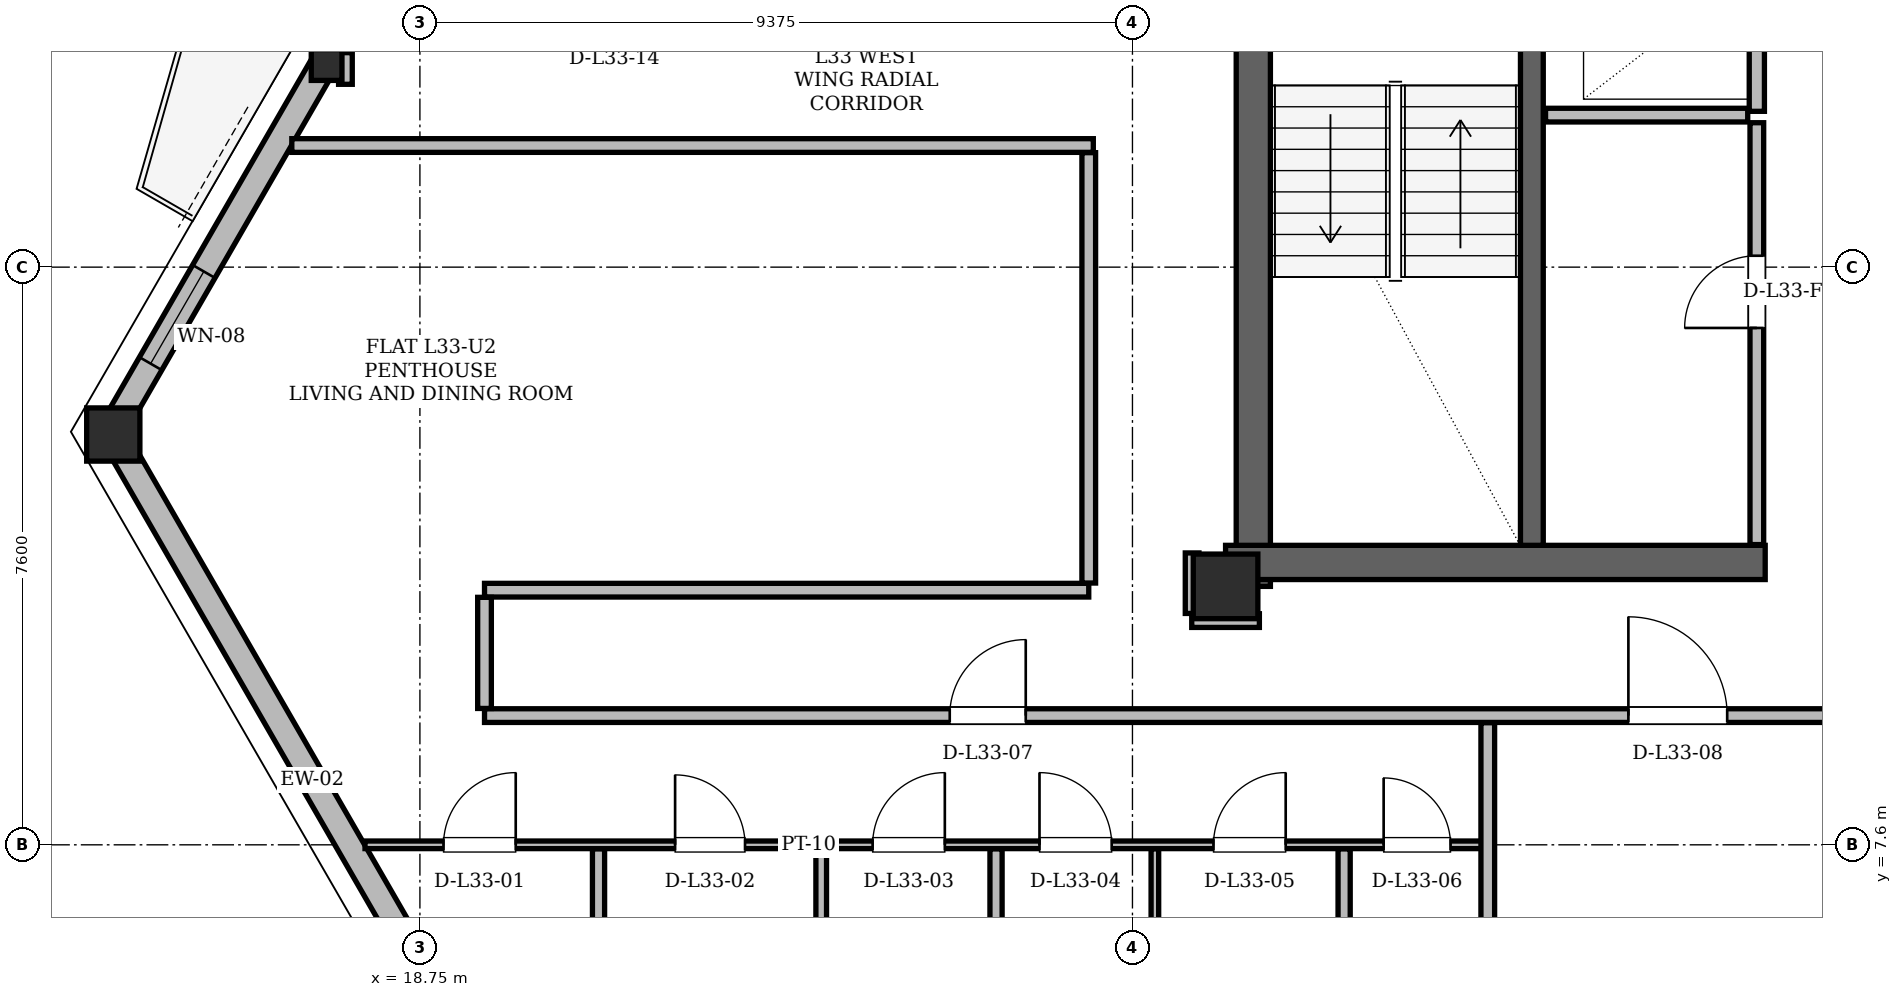
"""IFC4 building model, lengths in metres.
Left out: names, types, materials, properties, quantities, classifications, styles, units other than length and angle.
Written with IfcOpenShell. Run it as: python <this file> out.ifc"""

import sys

from ifc_helpers import new_model, si_unit, direction, frame, frame_2d, origin, origin_2d, place, context, subcontext, project, spatial, rectangle, hollow_rectangle, i_section, extrude, element, fill, save


model = new_model("IFC4")
c1 = context("Model", 3, precision=1e-05, world=origin(), true_north=direction((0.0, 1.0)))
c2 = subcontext(c1, "Body", "Model", "MODEL_VIEW")
j1 = project(units=[si_unit("LENGTHUNIT", "METRE"), si_unit("PLANEANGLEUNIT", "RADIAN")], contexts=[c1])
p1 = place(None, origin())
s1 = spatial("IfcSite", under=j1, at=p1, CompositionType="ELEMENT")
p2 = place(p1, origin())
s2 = spatial("IfcBuilding", under=s1, at=p2, CompositionType="ELEMENT")
p3 = place(p2, frame((0.0, 0.0, 126.6)))
s3 = spatial("IfcBuildingStorey", under=s2, at=p3, CompositionType="ELEMENT", Elevation=126.6)
p4 = place(p3, frame((29.35, 11.0, 0.0), z_axis=(0.0, 0.0, 1.0), x_axis=(1.0, 0.0, 0.0)))
e1 = element("IfcColumn", 1, at=p4, inside=s3, PredefinedType="COLUMN", context=c2, shape_type="SweptSolid", body=[
    extrude(hollow_rectangle(XDim=0.85, YDim=0.85, WallThickness=0.07, at=origin_2d()), origin(), (0.0, 0.0, 1.0), 3.6),
])
p5 = place(p3, frame((14.689, 13.034, 0.004), z_axis=(0.014612382171, -0.020117512198, 0.999690834203), x_axis=(0.809090542382, 0.587684008825, 0.0)))
e2 = element("IfcColumn", 2, at=p5, inside=s3, PredefinedType="COLUMN", context=c2, shape_type="SweptSolid", body=[
    extrude(hollow_rectangle(XDim=0.7, YDim=0.7, WallThickness=0.055, at=origin_2d()), origin(), (0.0, 0.0, 1.0), 3.592),
])
p6 = place(p3, frame((17.493, 17.891, 0.004), z_axis=(0.01617604101, -0.017263505952, 0.999720114362), x_axis=(0.729716361997, 0.68374997699, 0.0)))
e3 = element("IfcColumn", 3, at=p6, inside=s3, PredefinedType="COLUMN", context=c2, shape_type="SweptSolid", body=[
    extrude(i_section(OverallWidth=0.404, OverallDepth=0.406, WebThickness=0.027, FlangeThickness=0.044, at=origin_2d()), origin(), (0.0, 0.0, 1.0), 3.592),
])
p7 = place(p3, frame((29.715, 11.0, 0.0), z_axis=(0.0, 0.0, 1.0), x_axis=(0.0, 1.0, 0.0)))
e4 = element("IfcWall", 4, at=p7, inside=s3, PredefinedType="SHEAR", context=c2, shape_type="SweptSolid", body=[
    extrude(rectangle(XDim=13.3, YDim=0.45, at=frame_2d((6.65, 0.0))), origin(), (0.0, 0.0, 1.0), 3.36),
])
p8 = place(p3, frame((29.35, 11.315, 0.0), z_axis=(0.0, 0.0, 1.0), x_axis=(1.0, 0.0, 0.0)))
e5 = element("IfcWall", 5, at=p8, inside=s3, PredefinedType="SHEAR", context=c2, shape_type="SweptSolid", body=[
    extrude(rectangle(XDim=7.1, YDim=0.45, at=frame_2d((3.55, 0.0))), origin(), (0.0, 0.0, 1.0), 3.36),
])
p9 = place(p3, frame((33.38, 11.54, 0.0), z_axis=(0.0, 0.0, 1.0), x_axis=(0.0, 1.0, 0.0)))
e6 = element("IfcWall", 6, at=p9, inside=s3, PredefinedType="SHEAR", context=c2, shape_type="SweptSolid", body=[
    extrude(rectangle(XDim=7.62, YDim=0.3, at=frame_2d((3.81, 0.0))), origin(), (0.0, 0.0, 1.0), 3.36),
])
p10 = place(p3, frame((14.689, 13.034, 0.0), z_axis=(0.0, 0.0, 1.0), x_axis=(0.500003640647, -0.866023301845, 0.0)))
e7 = element("IfcWall", 7, at=p10, inside=s3, PredefinedType="SOLIDWALL", context=c2, shape_type="SweptSolid", body=[
    extrude(rectangle(XDim=10.572, YDim=0.34, at=frame_2d((5.286, 0.0))), origin(), (0.0, 0.0, 1.0), 2.578),
])
p11 = place(p3, frame((32.214, 43.387, 0.0), z_axis=(0.0, 0.0, 1.0), x_axis=(-0.499998814518, -0.866026088222, 0.0)))
e8 = element("IfcWall", 8, at=p11, inside=s3, PredefinedType="SOLIDWALL", context=c2, shape_type="SweptSolid", body=[
    extrude(rectangle(XDim=35.049, YDim=0.34, at=frame_2d((17.524, 0.0))), origin(), (0.0, 0.0, 1.0), 2.578),
])
p12 = place(p11, frame((8.034, 0.0, 0.0)))
e9 = element("IfcOpeningElement", 9, at=p12, cuts=e8, PredefinedType="OPENING", context=c2, shape_type="SweptSolid", body=[
    extrude(rectangle(XDim=1.5, YDim=2.2, at=frame_2d((0.75, 1.1))), frame((0.0, 0.17, 0.0), z_axis=(0.0, -1.0, 0.0), x_axis=(1.0, 0.0, 0.0)), (0.0, 0.0, 1.0), 0.34),
])
p13 = place(p11, frame((26.97, 0.0, 0.0)))
e10 = element("IfcOpeningElement", 10, at=p13, cuts=e8, PredefinedType="OPENING", context=c2, shape_type="SweptSolid", body=[
    extrude(rectangle(XDim=1.5, YDim=2.2, at=frame_2d((0.75, 1.1))), frame((0.0, 0.17, 0.0), z_axis=(0.0, -1.0, 0.0), x_axis=(1.0, 0.0, 0.0)), (0.0, 0.0, 1.0), 0.34),
])
p14 = place(p11, frame((32.614, 0.0, 0.85)))
e11 = element("IfcOpeningElement", 11, at=p14, cuts=e8, PredefinedType="OPENING", context=c2, shape_type="SweptSolid", body=[
    extrude(rectangle(XDim=1.4, YDim=1.6, at=frame_2d((0.7, 0.8))), frame((0.0, 0.17, 0.0), z_axis=(0.0, -1.0, 0.0), x_axis=(1.0, 0.0, 0.0)), (0.0, 0.0, 1.0), 0.34),
])
p15 = place(p11, frame((22.603, 0.0, 0.85)))
e12 = element("IfcOpeningElement", 12, at=p15, cuts=e8, PredefinedType="OPENING", context=c2, shape_type="SweptSolid", body=[
    extrude(rectangle(XDim=1.2, YDim=1.48, at=frame_2d((0.6, 0.74))), frame((0.0, 0.17, 0.0), z_axis=(0.0, -1.0, 0.0), x_axis=(1.0, 0.0, 0.0)), (0.0, 0.0, 1.0), 0.34),
])
p16 = place(p11, frame((2.414, 0.0, 0.85)))
e13 = element("IfcOpeningElement", 13, at=p16, cuts=e8, PredefinedType="OPENING", context=c2, shape_type="SweptSolid", body=[
    extrude(rectangle(XDim=1.4, YDim=1.6, at=frame_2d((0.7, 0.8))), frame((0.0, 0.17, 0.0), z_axis=(0.0, -1.0, 0.0), x_axis=(1.0, 0.0, 0.0)), (0.0, 0.0, 1.0), 0.34),
])
p17 = place(p11, frame((13.484, 0.0, 0.85)))
e14 = element("IfcOpeningElement", 14, at=p17, cuts=e8, PredefinedType="OPENING", context=c2, shape_type="SweptSolid", body=[
    extrude(rectangle(XDim=2.5, YDim=1.618, at=frame_2d((1.25, 0.809))), frame((0.0, 0.17, 0.0), z_axis=(0.0, -1.0, 0.0), x_axis=(1.0, 0.0, 0.0)), (0.0, 0.0, 1.0), 0.34),
])
p18 = place(p11, frame((18.27, 0.0, 0.85)))
e15 = element("IfcOpeningElement", 15, at=p18, cuts=e8, PredefinedType="OPENING", context=c2, shape_type="SweptSolid", body=[
    extrude(rectangle(XDim=1.2, YDim=1.48, at=frame_2d((0.6, 0.74))), frame((0.0, 0.17, 0.0), z_axis=(0.0, -1.0, 0.0), x_axis=(1.0, 0.0, 0.0)), (0.0, 0.0, 1.0), 0.34),
])
p19 = place(p11, frame((20.466, 0.0, 0.85)))
e16 = element("IfcOpeningElement", 16, at=p19, cuts=e8, PredefinedType="OPENING", context=c2, shape_type="SweptSolid", body=[
    extrude(rectangle(XDim=1.2, YDim=1.48, at=frame_2d((0.6, 0.74))), frame((0.0, 0.17, 0.0), z_axis=(0.0, -1.0, 0.0), x_axis=(1.0, 0.0, 0.0)), (0.0, 0.0, 1.0), 0.34),
])
p20 = place(p3, frame((36.34, 17.25, 0.0), z_axis=(0.0, 0.0, 1.0), x_axis=(0.0, 1.0, 0.0)))
e17 = element("IfcWall", 17, at=p20, inside=s3, PredefinedType="PARTITIONING", context=c2, shape_type="SweptSolid", body=[
    extrude(rectangle(XDim=2.07, YDim=0.2, at=frame_2d((1.035, 0.0))), origin(), (0.0, 0.0, 1.0), 3.36),
])
p21 = place(p3, frame((33.56, 17.2, 0.0), z_axis=(0.0, 0.0, 1.0), x_axis=(1.0, 0.0, 0.0)))
e18 = element("IfcWall", 18, at=p21, inside=s3, PredefinedType="PARTITIONING", context=c2, shape_type="SweptSolid", body=[
    extrude(rectangle(XDim=2.66, YDim=0.18, at=frame_2d((1.33, 0.0))), origin(), (0.0, 0.0, 1.0), 3.36),
])
p22 = place(p3, frame((36.34, 11.55, 0.0), z_axis=(0.0, 0.0, 1.0), x_axis=(0.0, 1.0, 0.0)))
e19 = element("IfcWall", 19, at=p22, inside=s3, PredefinedType="PARTITIONING", context=c2, shape_type="SweptSolid", body=[
    extrude(rectangle(XDim=5.55, YDim=0.18, at=frame_2d((2.775, 0.0))), origin(), (0.0, 0.0, 1.0), 3.36),
])
p23 = place(p22, frame((2.85, 0.0, 0.0)))
e20 = element("IfcOpeningElement", 20, at=p23, cuts=e19, PredefinedType="OPENING", context=c2, shape_type="SweptSolid", body=[
    extrude(rectangle(XDim=0.95, YDim=2.1, at=frame_2d((0.475, 1.05))), frame((0.0, 0.09, 0.0), z_axis=(0.0, -1.0, 0.0), x_axis=(1.0, 0.0, 0.0)), (0.0, 0.0, 1.0), 0.18),
])
p24 = place(p3, frame((18.028, 7.6, 0.0), z_axis=(0.0, 0.0, 1.0), x_axis=(1.0, 0.0, 0.0)))
e21 = element("IfcWall", 21, at=p24, inside=s3, PredefinedType="PARTITIONING", context=c2, shape_type="SweptSolid", body=[
    extrude(rectangle(XDim=14.823, YDim=0.1, at=frame_2d((7.411, 0.0))), origin(), (0.0, 0.0, 1.0), 2.814),
])
p25 = place(p24, frame((1.033, 0.0, 0.0)))
e22 = element("IfcOpeningElement", 22, at=p25, cuts=e21, PredefinedType="OPENING", context=c2, shape_type="SweptSolid", body=[
    extrude(rectangle(XDim=0.95, YDim=2.1, at=frame_2d((0.475, 1.05))), frame((0.0, 0.05, 0.0), z_axis=(0.0, -1.0, 0.0), x_axis=(1.0, 0.0, 0.0)), (0.0, 0.0, 1.0), 0.1),
])
p26 = place(p24, frame((4.08, 0.0, 0.0)))
e23 = element("IfcOpeningElement", 23, at=p26, cuts=e21, PredefinedType="OPENING", context=c2, shape_type="SweptSolid", body=[
    extrude(rectangle(XDim=0.92, YDim=2.12, at=frame_2d((0.46, 1.06))), frame((0.0, 0.05, 0.0), z_axis=(0.0, -1.0, 0.0), x_axis=(1.0, 0.0, 0.0)), (0.0, 0.0, 1.0), 0.1),
])
p27 = place(p24, frame((6.679, 0.0, 0.0)))
e24 = element("IfcOpeningElement", 24, at=p27, cuts=e21, PredefinedType="OPENING", context=c2, shape_type="SweptSolid", body=[
    extrude(rectangle(XDim=0.95, YDim=2.1, at=frame_2d((0.475, 1.05))), frame((0.0, 0.05, 0.0), z_axis=(0.0, -1.0, 0.0), x_axis=(1.0, 0.0, 0.0)), (0.0, 0.0, 1.0), 0.1),
])
p28 = place(p24, frame((8.874, 0.0, 0.0)))
e25 = element("IfcOpeningElement", 25, at=p28, cuts=e21, PredefinedType="OPENING", context=c2, shape_type="SweptSolid", body=[
    extrude(rectangle(XDim=0.95, YDim=2.1, at=frame_2d((0.475, 1.05))), frame((0.0, 0.05, 0.0), z_axis=(0.0, -1.0, 0.0), x_axis=(1.0, 0.0, 0.0)), (0.0, 0.0, 1.0), 0.1),
])
p29 = place(p24, frame((11.164, 0.0, 0.0)))
e26 = element("IfcOpeningElement", 26, at=p29, cuts=e21, PredefinedType="OPENING", context=c2, shape_type="SweptSolid", body=[
    extrude(rectangle(XDim=0.95, YDim=2.1, at=frame_2d((0.475, 1.05))), frame((0.0, 0.05, 0.0), z_axis=(0.0, -1.0, 0.0), x_axis=(1.0, 0.0, 0.0)), (0.0, 0.0, 1.0), 0.1),
])
p30 = place(p24, frame((13.402, 0.0, 0.0)))
e27 = element("IfcOpeningElement", 27, at=p30, cuts=e21, PredefinedType="OPENING", context=c2, shape_type="SweptSolid", body=[
    extrude(rectangle(XDim=0.88, YDim=2.08, at=frame_2d((0.44, 1.04))), frame((0.0, 0.05, 0.0), z_axis=(0.0, -1.0, 0.0), x_axis=(1.0, 0.0, 0.0)), (0.0, 0.0, 1.0), 0.1),
])
p31 = place(p3, frame((19.6, 9.3, 0.0), z_axis=(0.0, 0.0, 1.0), x_axis=(1.0, 0.0, 0.0)))
e28 = element("IfcWall", 28, at=p31, inside=s3, PredefinedType="PARTITIONING", context=c2, shape_type="SweptSolid", body=[
    extrude(rectangle(XDim=30.4, YDim=0.18, at=frame_2d((15.2, 0.0))), origin(), (0.0, 0.0, 1.0), 2.814),
])
p32 = place(p31, frame((6.121, 0.0, 0.0)))
e29 = element("IfcOpeningElement", 29, at=p32, cuts=e28, PredefinedType="OPENING", context=c2, shape_type="SweptSolid", body=[
    extrude(rectangle(XDim=1.0, YDim=2.18, at=frame_2d((0.5, 1.09))), frame((0.0, 0.09, 0.0), z_axis=(0.0, -1.0, 0.0), x_axis=(1.0, 0.0, 0.0)), (0.0, 0.0, 1.0), 0.18),
])
p33 = place(p31, frame((15.05, 0.0, 0.0)))
e30 = element("IfcOpeningElement", 30, at=p33, cuts=e28, PredefinedType="OPENING", context=c2, shape_type="SweptSolid", body=[
    extrude(rectangle(XDim=1.3, YDim=2.2, at=frame_2d((0.65, 1.1))), frame((0.0, 0.09, 0.0), z_axis=(0.0, -1.0, 0.0), x_axis=(1.0, 0.0, 0.0)), (0.0, 0.0, 1.0), 0.18),
])
p34 = place(p31, frame((24.631, 0.0, 0.0)))
e31 = element("IfcOpeningElement", 31, at=p34, cuts=e28, PredefinedType="OPENING", context=c2, shape_type="SweptSolid", body=[
    extrude(rectangle(XDim=1.0, YDim=2.18, at=frame_2d((0.5, 1.09))), frame((0.0, 0.09, 0.0), z_axis=(0.0, -1.0, 0.0), x_axis=(1.0, 0.0, 0.0)), (0.0, 0.0, 1.0), 0.18),
])
p35 = place(p3, frame((28.905, 10.55, 0.0), z_axis=(0.0, 0.0, 1.0), x_axis=(1.0, 0.0, 0.0)))
e32 = element("IfcWall", 32, at=p35, inside=s3, PredefinedType="PARTITIONING", context=c2, shape_type="SweptSolid", body=[
    extrude(rectangle(XDim=0.89, YDim=0.18, at=frame_2d((0.445, 0.0))), origin(), (0.0, 0.0, 1.0), 3.36),
])
p36 = place(p3, frame((19.6, 10.95, 0.0), z_axis=(0.0, 0.0, 1.0), x_axis=(1.0, 0.0, 0.0)))
e33 = element("IfcWall", 33, at=p36, inside=s3, PredefinedType="PARTITIONING", context=c2, shape_type="SweptSolid", body=[
    extrude(rectangle(XDim=7.95, YDim=0.18, at=frame_2d((3.975, 0.0))), origin(), (0.0, 0.0, 1.0), 3.36),
])
p37 = place(p3, frame((17.065, 16.8, 0.0), z_axis=(0.0, 0.0, 1.0), x_axis=(1.0, 0.0, 0.0)))
e34 = element("IfcWall", 34, at=p37, inside=s3, PredefinedType="PARTITIONING", context=c2, shape_type="SweptSolid", body=[
    extrude(rectangle(XDim=10.545, YDim=0.18, at=frame_2d((5.273, 0.0))), origin(), (0.0, 0.0, 1.0), 3.36),
])
p38 = place(p3, frame((17.77, 17.605, 0.0), z_axis=(0.0, 0.0, 1.0), x_axis=(0.0, 1.0, 0.0)))
e35 = element("IfcWall", 35, at=p38, inside=s3, PredefinedType="PARTITIONING", context=c2, shape_type="SweptSolid", body=[
    extrude(rectangle(XDim=0.417, YDim=0.18, at=frame_2d((0.208, 0.0))), origin(), (0.0, 0.0, 1.0), 2.578),
])
p39 = place(p3, frame((19.6, 9.394, 0.0), z_axis=(0.0, 0.0, 1.0), x_axis=(0.0, 1.0, 0.0)))
e36 = element("IfcWall", 36, at=p39, inside=s3, PredefinedType="PARTITIONING", context=c2, shape_type="SweptSolid", body=[
    extrude(rectangle(XDim=1.462, YDim=0.18, at=frame_2d((0.731, 0.0))), origin(), (0.0, 0.0, 1.0), 3.36),
])
p40 = place(p3, frame((21.1, 4.052, 0.0), z_axis=(0.0, 0.0, 1.0), x_axis=(0.0, 1.0, 0.0)))
e37 = element("IfcWall", 37, at=p40, inside=s3, PredefinedType="PARTITIONING", context=c2, shape_type="SweptSolid", body=[
    extrude(rectangle(XDim=3.494, YDim=0.16, at=frame_2d((1.747, 0.0))), origin(), (0.0, 0.0, 1.0), 2.814),
])
p41 = place(p3, frame((24.03, 4.052, 0.0), z_axis=(0.0, 0.0, 1.0), x_axis=(0.0, 1.0, 0.0)))
e38 = element("IfcWall", 38, at=p41, inside=s3, PredefinedType="PARTITIONING", context=c2, shape_type="SweptSolid", body=[
    extrude(rectangle(XDim=3.494, YDim=0.14, at=frame_2d((1.747, 0.0))), origin(), (0.0, 0.0, 1.0), 2.814),
])
p42 = place(p3, frame((26.33, 4.052, 0.0), z_axis=(0.0, 0.0, 1.0), x_axis=(0.0, 1.0, 0.0)))
e39 = element("IfcWall", 39, at=p42, inside=s3, PredefinedType="PARTITIONING", context=c2, shape_type="SweptSolid", body=[
    extrude(rectangle(XDim=3.494, YDim=0.16, at=frame_2d((1.747, 0.0))), origin(), (0.0, 0.0, 1.0), 2.946),
])
p43 = place(p3, frame((27.55, 11.044, 0.0), z_axis=(0.0, 0.0, 1.0), x_axis=(0.0, 1.0, 0.0)))
e40 = element("IfcWall", 40, at=p43, inside=s3, PredefinedType="PARTITIONING", context=c2, shape_type="SweptSolid", body=[
    extrude(rectangle(XDim=5.662, YDim=0.18, at=frame_2d((2.831, 0.0))), origin(), (0.0, 0.0, 1.0), 2.814),
])
p44 = place(p3, frame((28.42, 4.052, 0.0), z_axis=(0.0, 0.0, 1.0), x_axis=(0.0, 1.0, 0.0)))
e41 = element("IfcWall", 41, at=p44, inside=s3, PredefinedType="PARTITIONING", context=c2, shape_type="SweptSolid", body=[
    extrude(rectangle(XDim=3.494, YDim=0.1, at=frame_2d((1.747, 0.0))), origin(), (0.0, 0.0, 1.0), 3.36),
])
p45 = place(p3, frame((28.91, 10.644, 0.0), z_axis=(0.0, 0.0, 1.0), x_axis=(0.0, 1.0, 0.0)))
e42 = element("IfcWall", 42, at=p45, inside=s3, PredefinedType="PARTITIONING", context=c2, shape_type="SweptSolid", body=[
    extrude(rectangle(XDim=0.796, YDim=0.18, at=frame_2d((0.398, 0.0))), origin(), (0.0, 0.0, 1.0), 2.814),
])
p46 = place(p3, frame((30.91, 4.052, 0.0), z_axis=(0.0, 0.0, 1.0), x_axis=(0.0, 1.0, 0.0)))
e43 = element("IfcWall", 43, at=p46, inside=s3, PredefinedType="PARTITIONING", context=c2, shape_type="SweptSolid", body=[
    extrude(rectangle(XDim=3.494, YDim=0.16, at=frame_2d((1.747, 0.0))), origin(), (0.0, 0.0, 1.0), 2.946),
])
p47 = place(p3, frame((32.8, 5.094, 0.0), z_axis=(0.0, 0.0, 1.0), x_axis=(0.0, 1.0, 0.0)))
e44 = element("IfcWall", 44, at=p47, inside=s3, PredefinedType="PARTITIONING", context=c2, shape_type="SweptSolid", body=[
    extrude(rectangle(XDim=4.112, YDim=0.18, at=frame_2d((2.056, 0.0))), origin(), (0.0, 0.0, 1.0), 2.946),
])
p48 = place(p14, origin())
e45 = element("IfcWindow", 45, at=p48, inside=s3, PartitioningType="SINGLE_PANEL", PredefinedType="WINDOW", context=c2, shape_type="SweptSolid", body=[
    extrude(rectangle(XDim=1.4, YDim=1.6, at=frame_2d((0.7, 0.8))), frame((0.0, 0.03, 0.0), z_axis=(0.0, -1.0, 0.0), x_axis=(1.0, 0.0, 0.0)), (0.0, 0.0, 1.0), 0.06),
])
fill(e11, e45)
p49 = place(p23, origin())
e46 = element("IfcDoor", 46, at=p49, inside=s3, OperationType="SINGLE_SWING_LEFT", PredefinedType="DOOR", context=c2, shape_type="SweptSolid", body=[
    extrude(rectangle(XDim=0.95, YDim=2.1, at=frame_2d((0.475, 1.05))), frame((0.0, 0.025, 0.0), z_axis=(0.0, -1.0, 0.0), x_axis=(1.0, 0.0, 0.0)), (0.0, 0.0, 1.0), 0.05),
])
fill(e20, e46)
p50 = place(p25, origin())
e47 = element("IfcDoor", 47, at=p50, inside=s3, OperationType="SINGLE_SWING_RIGHT", PredefinedType="DOOR", context=c2, shape_type="SweptSolid", body=[
    extrude(rectangle(XDim=0.95, YDim=2.1, at=frame_2d((0.475, 1.05))), frame((0.0, 0.025, 0.0), z_axis=(0.0, -1.0, 0.0), x_axis=(1.0, 0.0, 0.0)), (0.0, 0.0, 1.0), 0.05),
])
fill(e22, e47)
p51 = place(p26, origin())
e48 = element("IfcDoor", 48, at=p51, inside=s3, OperationType="SINGLE_SWING_LEFT", PredefinedType="DOOR", context=c2, shape_type="SweptSolid", body=[
    extrude(rectangle(XDim=0.92, YDim=2.12, at=frame_2d((0.46, 1.06))), frame((0.0, 0.025, 0.0), z_axis=(0.0, -1.0, 0.0), x_axis=(1.0, 0.0, 0.0)), (0.0, 0.0, 1.0), 0.05),
])
fill(e23, e48)
p52 = place(p27, origin())
e49 = element("IfcDoor", 49, at=p52, inside=s3, OperationType="SINGLE_SWING_RIGHT", PredefinedType="DOOR", context=c2, shape_type="SweptSolid", body=[
    extrude(rectangle(XDim=0.95, YDim=2.1, at=frame_2d((0.475, 1.05))), frame((0.0, 0.025, 0.0), z_axis=(0.0, -1.0, 0.0), x_axis=(1.0, 0.0, 0.0)), (0.0, 0.0, 1.0), 0.05),
])
fill(e24, e49)
p53 = place(p28, origin())
e50 = element("IfcDoor", 50, at=p53, inside=s3, OperationType="SINGLE_SWING_LEFT", PredefinedType="DOOR", context=c2, shape_type="SweptSolid", body=[
    extrude(rectangle(XDim=0.95, YDim=2.1, at=frame_2d((0.475, 1.05))), frame((0.0, 0.025, 0.0), z_axis=(0.0, -1.0, 0.0), x_axis=(1.0, 0.0, 0.0)), (0.0, 0.0, 1.0), 0.05),
])
fill(e25, e50)
p54 = place(p29, origin())
e51 = element("IfcDoor", 51, at=p54, inside=s3, OperationType="SINGLE_SWING_RIGHT", PredefinedType="DOOR", context=c2, shape_type="SweptSolid", body=[
    extrude(rectangle(XDim=0.95, YDim=2.1, at=frame_2d((0.475, 1.05))), frame((0.0, 0.025, 0.0), z_axis=(0.0, -1.0, 0.0), x_axis=(1.0, 0.0, 0.0)), (0.0, 0.0, 1.0), 0.05),
])
fill(e26, e51)
p55 = place(p30, origin())
e52 = element("IfcDoor", 52, at=p55, inside=s3, OperationType="SINGLE_SWING_LEFT", PredefinedType="DOOR", context=c2, shape_type="SweptSolid", body=[
    extrude(rectangle(XDim=0.88, YDim=2.08, at=frame_2d((0.44, 1.04))), frame((0.0, 0.025, 0.0), z_axis=(0.0, -1.0, 0.0), x_axis=(1.0, 0.0, 0.0)), (0.0, 0.0, 1.0), 0.05),
])
fill(e27, e52)
p56 = place(p32, origin())
e53 = element("IfcDoor", 53, at=p56, inside=s3, OperationType="SINGLE_SWING_RIGHT", PredefinedType="DOOR", context=c2, shape_type="SweptSolid", body=[
    extrude(rectangle(XDim=1.0, YDim=2.18, at=frame_2d((0.5, 1.09))), frame((0.0, 0.025, 0.0), z_axis=(0.0, -1.0, 0.0), x_axis=(1.0, 0.0, 0.0)), (0.0, 0.0, 1.0), 0.05),
])
fill(e29, e53)
p57 = place(p33, origin())
e54 = element("IfcDoor", 54, at=p57, inside=s3, OperationType="SINGLE_SWING_LEFT", PredefinedType="DOOR", context=c2, shape_type="SweptSolid", body=[
    extrude(rectangle(XDim=1.3, YDim=2.2, at=frame_2d((0.65, 1.1))), frame((0.0, 0.025, 0.0), z_axis=(0.0, -1.0, 0.0), x_axis=(1.0, 0.0, 0.0)), (0.0, 0.0, 1.0), 0.05),
])
fill(e30, e54)
save(model, sys.argv[1])
